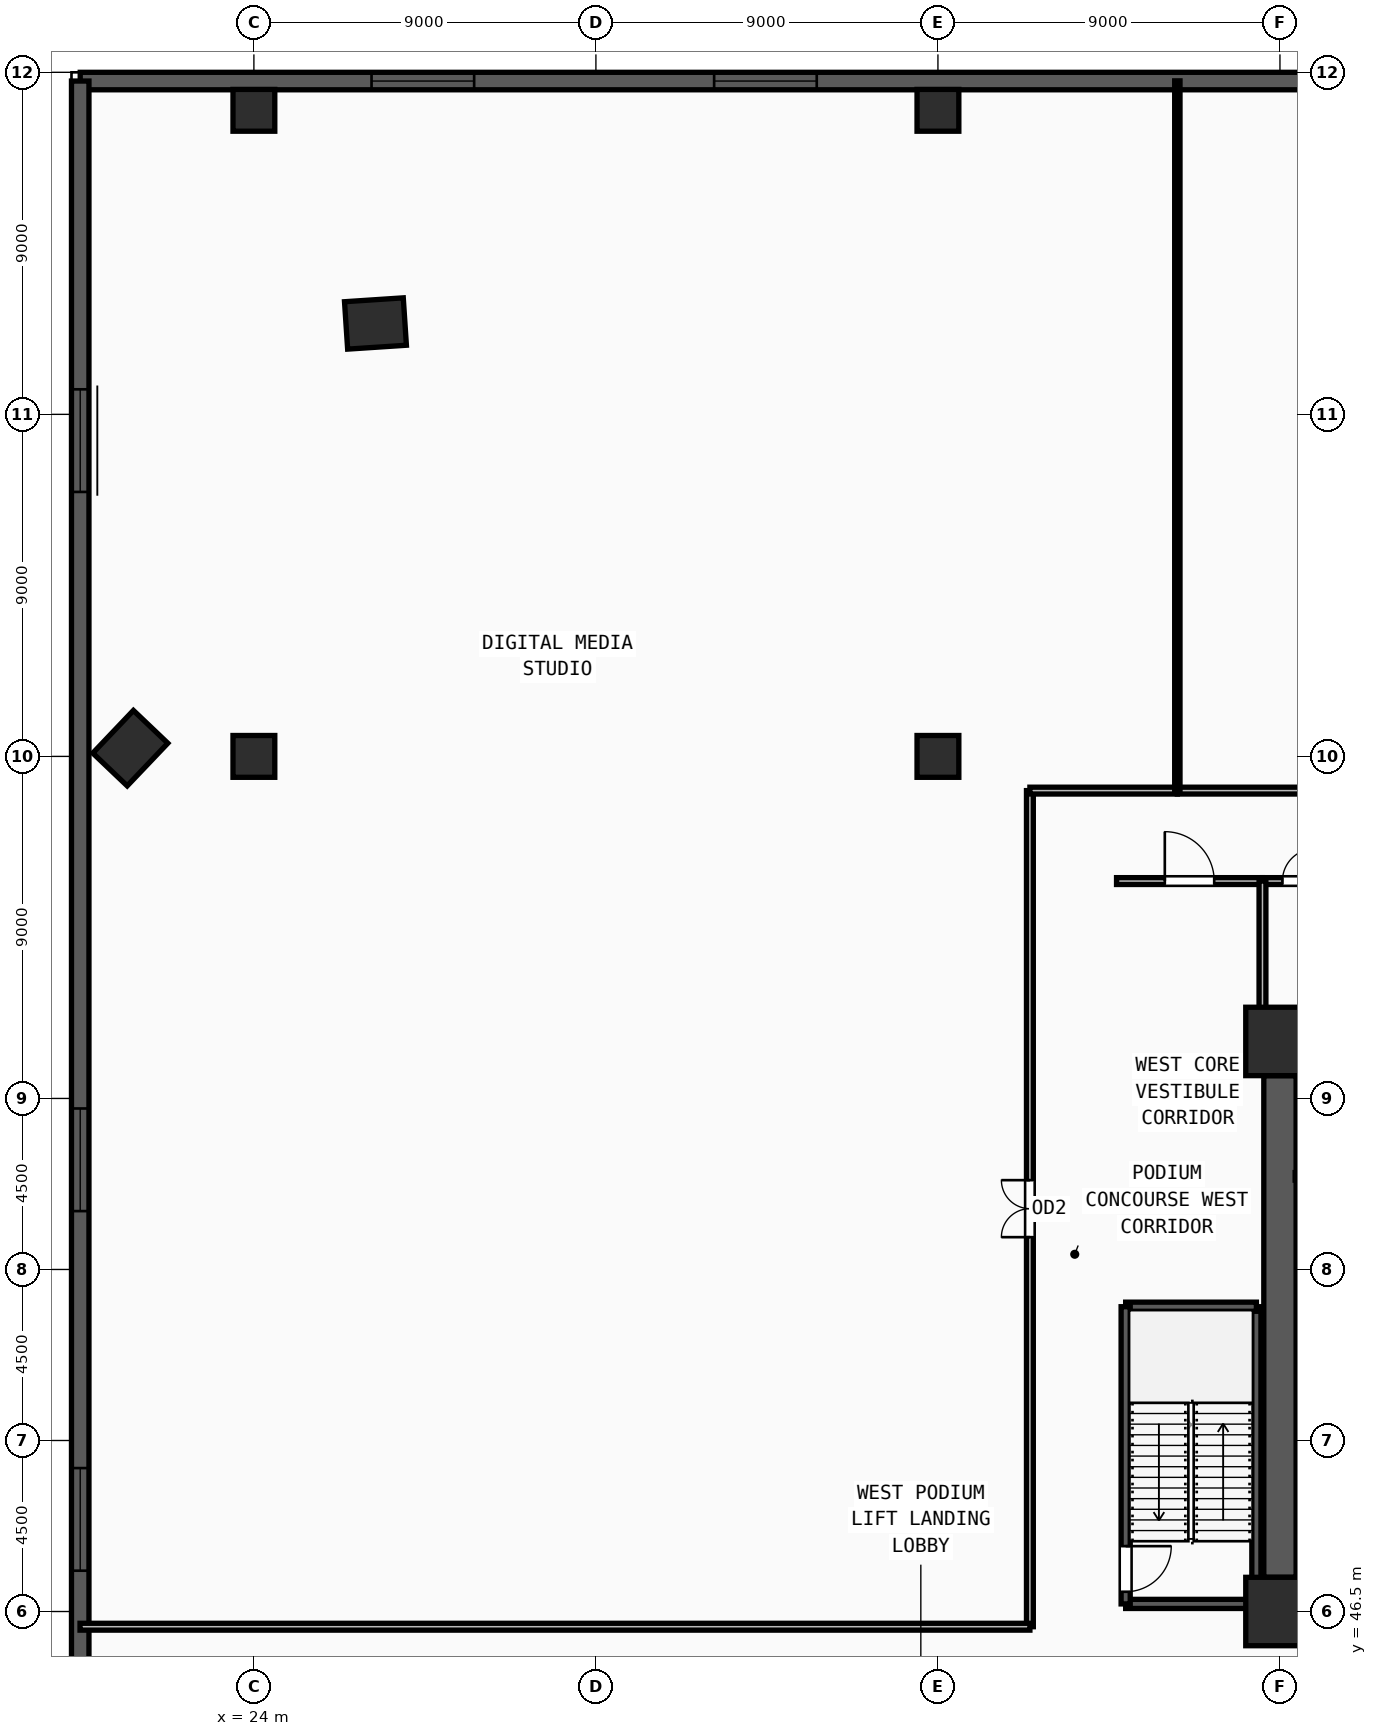
"""IFC4 building model, lengths in metres.
Left out: names, types, materials, properties, quantities, classifications, styles, units other than length and angle.
Written with IfcOpenShell. Run it as: python <this file> out.ifc"""

import sys

from ifc_helpers import new_model, si_unit, direction, frame, frame_2d, origin, origin_2d, place, context, subcontext, project, spatial, rectangle, extrude, source, transform, mapped, element, fill, save


model = new_model("IFC4")
c1 = context("Model", 3, precision=1e-05, world=origin(), true_north=direction((0.0, 1.0)))
c2 = subcontext(c1, "Body", "Model", "MODEL_VIEW")
j1 = project(units=[si_unit("LENGTHUNIT", "METRE"), si_unit("PLANEANGLEUNIT", "RADIAN")], contexts=[c1])
p1 = place(None, origin())
s1 = spatial("IfcSite", under=j1, at=p1, CompositionType="ELEMENT")
p2 = place(p1, origin())
s2 = spatial("IfcBuilding", under=s1, at=p2, CompositionType="ELEMENT")
p3 = place(p2, frame((0.0, 0.0, 14.4)))
s3 = spatial("IfcBuildingStorey", under=s2, at=p3, CompositionType="ELEMENT", Elevation=14.4)
m1 = source(origin(), c2, "Body", "SweptSolid", [
    extrude(rectangle(XDim=1.8, YDim=1.8, at=origin_2d()), origin(), (0.0, 0.0, 1.0), 4.5),
])
for number, where, z_axis, x_axis in (
    (1, (51.0, 46.5, 0.0), (0.0, 0.0, 1.0), (1.0, 0.0, 0.0)),
    (2, (51.0, 61.5, 0.0), (0.0, 0.0, 1.0), (1.0, 0.0, 0.0)),
):
    element("IfcColumn", number, at=place(p3, frame(where, z_axis=z_axis, x_axis=x_axis)), inside=s3, PredefinedType="COLUMN", context=c2, shape_type="MappedRepresentation", body=[
        mapped(m1, transform((0.0, 0.0, 0.0), x_axis=(1.0, 0.0, 0.0), y_axis=(0.0, 1.0, 0.0), z_axis=(0.0, 0.0, 1.0), scale=1.0)),
    ])
m2 = source(origin(), c2, "Body", "SweptSolid", [
    extrude(rectangle(XDim=1.55, YDim=1.25, at=origin_2d()), origin(), (0.0, 0.0, 1.0), 4.5),
])
for number, where, z_axis, x_axis in (
    (3, (20.748, 69.217, 0.0), (0.0, 0.0, 1.0), (0.689, 0.724, 0.0)),
    (4, (27.199, 80.391, 0.0), (0.0, 0.0, 1.0), (0.998, 0.066, 0.0)),
):
    element("IfcColumn", number, at=place(p3, frame(where, z_axis=z_axis, x_axis=x_axis)), inside=s3, PredefinedType="COLUMN", context=c2, shape_type="MappedRepresentation", body=[
        mapped(m2, transform((0.0, 0.0, 0.0), x_axis=(1.0, 0.0, 0.0), y_axis=(0.0, 1.0, 0.0), z_axis=(0.0, 0.0, 1.0), scale=1.0)),
    ])
m3 = source(origin(), c2, "Body", "SweptSolid", [
    extrude(rectangle(XDim=1.1, YDim=1.1, at=origin_2d()), origin(), (0.0, 0.0, 1.0), 4.5),
])
for number, where, z_axis, x_axis in (
    (5, (24.0, 69.0, 0.0), (0.0, 0.0, 1.0), (1.0, 0.0, 0.0)),
    (6, (42.0, 69.0, 0.0), (0.0, 0.0, 1.0), (1.0, 0.0, 0.0)),
    (7, (24.0, 86.0, 0.0), (0.0, 0.0, 1.0), (1.0, 0.0, 0.0)),
    (8, (42.0, 86.0, 0.0), (0.0, 0.0, 1.0), (1.0, 0.0, 0.0)),
):
    element("IfcColumn", number, at=place(p3, frame(where, z_axis=z_axis, x_axis=x_axis)), inside=s3, PredefinedType="COLUMN", context=c2, shape_type="MappedRepresentation", body=[
        mapped(m3, transform((0.0, 0.0, 0.0), x_axis=(1.0, 0.0, 0.0), y_axis=(0.0, 1.0, 0.0), z_axis=(0.0, 0.0, 1.0), scale=1.0)),
    ])
p4 = place(p3, frame((100.57, 86.77, 0.0), z_axis=(0.0, 0.0, 1.0), x_axis=(-1.0, 0.0, 0.0)))
e9 = element("IfcWall", 9, at=p4, inside=s3, PredefinedType="SOLIDWALL", context=c2, shape_type="SweptSolid", body=[
    extrude(rectangle(XDim=81.14, YDim=0.46, at=frame_2d((40.57, 0.0))), origin(), (0.0, 0.0, 1.0), 4.25),
])
m4 = source(origin(), c2, "Body", "SweptSolid", [
    extrude(rectangle(XDim=2.7, YDim=2.35, at=frame_2d((1.35, 1.175))), frame((0.0, 0.24, 0.0), z_axis=(0.0, -1.0, 0.0), x_axis=(1.0, 0.0, 0.0)), (0.0, 0.0, 1.0), 0.48),
])
p5 = place(p4, frame((7.666, 0.0, 0.55)))
e10 = element("IfcOpeningElement", 10, at=p5, cuts=e9, PredefinedType="OPENING", context=c2, shape_type="MappedRepresentation", body=[
    mapped(m4, transform((0.0, 0.0, 0.0), x_axis=(1.0, 0.0, 0.0), y_axis=(0.0, 1.0, 0.0), z_axis=(0.0, 0.0, 1.0), scale=1.0)),
])
p6 = place(p4, frame((16.681, 0.0, 0.55)))
e11 = element("IfcOpeningElement", 11, at=p6, cuts=e9, PredefinedType="OPENING", context=c2, shape_type="MappedRepresentation", body=[
    mapped(m4, transform((0.0, 0.0, 0.0), x_axis=(1.0, 0.0, 0.0), y_axis=(0.0, 1.0, 0.0), z_axis=(0.0, 0.0, 1.0), scale=1.0)),
])
p7 = place(p4, frame((34.712, 0.0, 0.55)))
e12 = element("IfcOpeningElement", 12, at=p7, cuts=e9, PredefinedType="OPENING", context=c2, shape_type="MappedRepresentation", body=[
    mapped(m4, transform((0.0, 0.0, 0.0), x_axis=(1.0, 0.0, 0.0), y_axis=(0.0, 1.0, 0.0), z_axis=(0.0, 0.0, 1.0), scale=1.0)),
])
p8 = place(p4, frame((43.728, 0.0, 0.55)))
e13 = element("IfcOpeningElement", 13, at=p8, cuts=e9, PredefinedType="OPENING", context=c2, shape_type="MappedRepresentation", body=[
    mapped(m4, transform((0.0, 0.0, 0.0), x_axis=(1.0, 0.0, 0.0), y_axis=(0.0, 1.0, 0.0), z_axis=(0.0, 0.0, 1.0), scale=1.0)),
])
p9 = place(p4, frame((61.759, 0.0, 0.55)))
e14 = element("IfcOpeningElement", 14, at=p9, cuts=e9, PredefinedType="OPENING", context=c2, shape_type="MappedRepresentation", body=[
    mapped(m4, transform((0.0, 0.0, 0.0), x_axis=(1.0, 0.0, 0.0), y_axis=(0.0, 1.0, 0.0), z_axis=(0.0, 0.0, 1.0), scale=1.0)),
])
p10 = place(p4, frame((70.774, 0.0, 0.55)))
e15 = element("IfcOpeningElement", 15, at=p10, cuts=e9, PredefinedType="OPENING", context=c2, shape_type="MappedRepresentation", body=[
    mapped(m4, transform((0.0, 0.0, 0.0), x_axis=(1.0, 0.0, 0.0), y_axis=(0.0, 1.0, 0.0), z_axis=(0.0, 0.0, 1.0), scale=1.0)),
])
p11 = place(p3, frame((19.43, 86.77, 0.0), z_axis=(0.0, 0.0, 1.0), x_axis=(0.0, -1.0, 0.0)))
e16 = element("IfcWall", 16, at=p11, inside=s3, PredefinedType="SOLIDWALL", context=c2, shape_type="SweptSolid", body=[
    extrude(rectangle(XDim=66.23, YDim=0.46, at=frame_2d((33.115, 0.0))), origin(), (0.0, 0.0, 1.0), 4.25),
])
p12 = place(p11, frame((8.111, 0.0, 0.55)))
e17 = element("IfcOpeningElement", 17, at=p12, cuts=e16, PredefinedType="OPENING", context=c2, shape_type="MappedRepresentation", body=[
    mapped(m4, transform((0.0, 0.0, 0.0), x_axis=(1.0, 0.0, 0.0), y_axis=(0.0, 1.0, 0.0), z_axis=(0.0, 0.0, 1.0), scale=1.0)),
])
p13 = place(p11, frame((27.034, 0.0, 0.55)))
e18 = element("IfcOpeningElement", 18, at=p13, cuts=e16, PredefinedType="OPENING", context=c2, shape_type="MappedRepresentation", body=[
    mapped(m4, transform((0.0, 0.0, 0.0), x_axis=(1.0, 0.0, 0.0), y_axis=(0.0, 1.0, 0.0), z_axis=(0.0, 0.0, 1.0), scale=1.0)),
])
p14 = place(p11, frame((36.496, 0.0, 0.55)))
e19 = element("IfcOpeningElement", 19, at=p14, cuts=e16, PredefinedType="OPENING", context=c2, shape_type="MappedRepresentation", body=[
    mapped(m4, transform((0.0, 0.0, 0.0), x_axis=(1.0, 0.0, 0.0), y_axis=(0.0, 1.0, 0.0), z_axis=(0.0, 0.0, 1.0), scale=1.0)),
])
p15 = place(p11, frame((45.957, 0.0, 0.55)))
e20 = element("IfcOpeningElement", 20, at=p15, cuts=e16, PredefinedType="OPENING", context=c2, shape_type="MappedRepresentation", body=[
    mapped(m4, transform((0.0, 0.0, 0.0), x_axis=(1.0, 0.0, 0.0), y_axis=(0.0, 1.0, 0.0), z_axis=(0.0, 0.0, 1.0), scale=1.0)),
])
p16 = place(p11, frame((55.419, 0.0, 0.55)))
e21 = element("IfcOpeningElement", 21, at=p16, cuts=e16, PredefinedType="OPENING", context=c2, shape_type="MappedRepresentation", body=[
    mapped(m4, transform((0.0, 0.0, 0.0), x_axis=(1.0, 0.0, 0.0), y_axis=(0.0, 1.0, 0.0), z_axis=(0.0, 0.0, 1.0), scale=1.0)),
])
p17 = place(p3, frame((51.0, 47.4, 0.0), z_axis=(0.0, 0.0, 1.0), x_axis=(0.0, 1.0, 0.0)))
e22 = element("IfcWall", 22, at=p17, inside=s3, PredefinedType="SHEAR", context=c2, shape_type="SweptSolid", body=[
    extrude(rectangle(XDim=13.2, YDim=0.85, at=frame_2d((6.6, 0.0))), origin(), (0.0, 0.0, 1.0), 4.25),
])
p18 = place(p3, frame((46.94, 46.7, 0.0), z_axis=(0.0, 0.0, 1.0), x_axis=(1.0, 0.0, 0.0)))
e23 = element("IfcWall", 23, at=p18, inside=s3, PredefinedType="SOLIDWALL", context=c2, shape_type="SweptSolid", body=[
    extrude(rectangle(XDim=3.44, YDim=0.24, at=frame_2d((1.72, 0.0))), origin(), (0.0, 0.0, 1.0), 4.25),
])
p19 = place(p3, frame((50.38, 46.7, 0.0), z_axis=(0.0, 0.0, 1.0), x_axis=(0.0, 1.0, 0.0)))
e24 = element("IfcWall", 24, at=p19, inside=s3, PredefinedType="SOLIDWALL", context=c2, shape_type="SweptSolid", body=[
    extrude(rectangle(XDim=7.82, YDim=0.24, at=frame_2d((3.91, 0.0))), origin(), (0.0, 0.0, 1.0), 4.25),
])
p20 = place(p3, frame((50.38, 54.52, 0.0), z_axis=(0.0, 0.0, 1.0), x_axis=(-1.0, 0.0, 0.0)))
e25 = element("IfcWall", 25, at=p20, inside=s3, PredefinedType="SOLIDWALL", context=c2, shape_type="SweptSolid", body=[
    extrude(rectangle(XDim=3.44, YDim=0.24, at=frame_2d((1.72, 0.0))), origin(), (0.0, 0.0, 1.0), 4.25),
])
p21 = place(p3, frame((46.94, 54.52, 0.0), z_axis=(0.0, 0.0, 1.0), x_axis=(0.0, -1.0, 0.0)))
e26 = element("IfcWall", 26, at=p21, inside=s3, PredefinedType="SOLIDWALL", context=c2, shape_type="SweptSolid", body=[
    extrude(rectangle(XDim=7.82, YDim=0.24, at=frame_2d((3.91, 0.0))), origin(), (0.0, 0.0, 1.0), 4.25),
])
m5 = source(origin(), c2, "Body", "SweptSolid", [
    extrude(rectangle(XDim=1.2, YDim=2.2, at=frame_2d((0.6, 1.1))), frame((0.0, 0.13, 0.0), z_axis=(0.0, -1.0, 0.0), x_axis=(1.0, 0.0, 0.0)), (0.0, 0.0, 1.0), 0.26),
])
p22 = place(p21, frame((6.3, 0.0, 0.0)))
e27 = element("IfcOpeningElement", 27, at=p22, cuts=e26, PredefinedType="OPENING", context=c2, shape_type="MappedRepresentation", body=[
    mapped(m5, transform((0.0, 0.0, 0.0), x_axis=(1.0, 0.0, 0.0), y_axis=(0.0, 1.0, 0.0), z_axis=(0.0, 0.0, 1.0), scale=1.0)),
])
for number, where, z_axis, x_axis in (
    (28, (51.4, 57.95, 0.0), (0.0, 0.0, 1.0), (1.0, 0.0, 0.0)),
    (29, (53.8, 60.88, 0.0), (0.0, 0.0, 1.0), (-1.0, 0.0, 0.0)),
):
    element("IfcWall", number, at=place(p3, frame(where, z_axis=z_axis, x_axis=x_axis)), inside=s3, PredefinedType="SOLIDWALL", context=c2, shape_type="SweptSolid", body=[
        extrude(rectangle(XDim=2.4, YDim=0.2, at=frame_2d((1.2, 0.0))), origin(), (0.0, 0.0, 1.0), 4.25),
    ])
p23 = place(p3, frame((50.54, 65.72, 0.0), z_axis=(0.0, 0.0, 1.0), x_axis=(1.0, 0.0, 0.0)))
e30 = element("IfcWall", 30, at=p23, inside=s3, PredefinedType="PARTITIONING", context=c2, shape_type="SweptSolid", body=[
    extrude(rectangle(XDim=1.9, YDim=0.18, at=frame_2d((0.95, 0.0))), origin(), (0.0, 0.0, 1.0), 4.25),
])
m6 = source(origin(), c2, "Body", "SweptSolid", [
    extrude(rectangle(XDim=0.85, YDim=2.1, at=frame_2d((0.425, 1.05))), frame((0.0, 0.1, 0.0), z_axis=(0.0, -1.0, 0.0), x_axis=(1.0, 0.0, 0.0)), (0.0, 0.0, 1.0), 0.2),
])
p24 = place(p23, frame((0.525, 0.0, 0.0)))
e31 = element("IfcOpeningElement", 31, at=p24, cuts=e30, PredefinedType="OPENING", context=c2, shape_type="MappedRepresentation", body=[
    mapped(m6, transform((0.0, 0.0, 0.0), x_axis=(1.0, 0.0, 0.0), y_axis=(0.0, 1.0, 0.0), z_axis=(0.0, 0.0, 1.0), scale=1.0)),
])
p25 = place(p3, frame((46.7, 65.72, 0.0), z_axis=(0.0, 0.0, 1.0), x_axis=(1.0, 0.0, 0.0)))
e32 = element("IfcWall", 32, at=p25, inside=s3, PredefinedType="PARTITIONING", context=c2, shape_type="SweptSolid", body=[
    extrude(rectangle(XDim=3.84, YDim=0.18, at=frame_2d((1.92, 0.0))), origin(), (0.0, 0.0, 1.0), 4.25),
])
m7 = source(origin(), c2, "Body", "SweptSolid", [
    extrude(rectangle(XDim=1.3, YDim=2.2, at=frame_2d((0.65, 1.1))), frame((0.0, 0.1, 0.0), z_axis=(0.0, -1.0, 0.0), x_axis=(1.0, 0.0, 0.0)), (0.0, 0.0, 1.0), 0.2),
])
p26 = place(p25, frame((1.27, 0.0, 0.0)))
e33 = element("IfcOpeningElement", 33, at=p26, cuts=e32, PredefinedType="OPENING", context=c2, shape_type="MappedRepresentation", body=[
    mapped(m7, transform((0.0, 0.0, 0.0), x_axis=(1.0, 0.0, 0.0), y_axis=(0.0, 1.0, 0.0), z_axis=(0.0, 0.0, 1.0), scale=1.0)),
])
p27 = place(p3, frame((44.42, 46.1, 0.0), z_axis=(0.0, 0.0, 1.0), x_axis=(0.0, 1.0, 0.0)))
e34 = element("IfcWall", 34, at=p27, inside=s3, PredefinedType="PARTITIONING", context=c2, shape_type="SweptSolid", body=[
    extrude(rectangle(XDim=22.0, YDim=0.18, at=frame_2d((11.0, 0.0))), origin(), (0.0, 0.0, 1.0), 4.25),
])
m8 = source(origin(), c2, "Body", "SweptSolid", [
    extrude(rectangle(XDim=1.5, YDim=2.2, at=frame_2d((0.75, 1.1))), frame((0.0, 0.1, 0.0), z_axis=(0.0, -1.0, 0.0), x_axis=(1.0, 0.0, 0.0)), (0.0, 0.0, 1.0), 0.2),
])
p28 = place(p27, frame((10.25, 0.0, 0.0)))
e35 = element("IfcOpeningElement", 35, at=p28, cuts=e34, PredefinedType="OPENING", context=c2, shape_type="MappedRepresentation", body=[
    mapped(m8, transform((0.0, 0.0, 0.0), x_axis=(1.0, 0.0, 0.0), y_axis=(0.0, 1.0, 0.0), z_axis=(0.0, 0.0, 1.0), scale=1.0)),
])
p29 = place(p3, frame((48.3, 68.1, 0.0), z_axis=(0.0, 0.0, 1.0), x_axis=(1.0, 0.0, 0.0)))
e36 = element("IfcWall", 36, at=p29, inside=s3, PredefinedType="PARTITIONING", context=c2, shape_type="SweptSolid", body=[
    extrude(rectangle(XDim=23.4, YDim=0.18, at=frame_2d((11.7, 0.0))), origin(), (0.0, 0.0, 1.0), 4.25),
])
m9 = source(origin(), c2, "Body", "SweptSolid", [
    extrude(rectangle(XDim=1.0, YDim=2.2, at=frame_2d((0.5, 1.1))), frame((0.0, 0.1, 0.0), z_axis=(0.0, -1.0, 0.0), x_axis=(1.0, 0.0, 0.0)), (0.0, 0.0, 1.0), 0.2),
])
p30 = place(p29, frame((11.2, 0.0, 0.0)))
e37 = element("IfcOpeningElement", 37, at=p30, cuts=e36, PredefinedType="OPENING", context=c2, shape_type="MappedRepresentation", body=[
    mapped(m9, transform((0.0, 0.0, 0.0), x_axis=(1.0, 0.0, 0.0), y_axis=(0.0, 1.0, 0.0), z_axis=(0.0, 0.0, 1.0), scale=1.0)),
])
p31 = place(p3, frame((19.425, 46.1, 0.0), z_axis=(0.0, 0.0, 1.0), x_axis=(1.0, 0.0, 0.0)))
e38 = element("IfcWall", 38, at=p31, inside=s3, PredefinedType="PARTITIONING", context=c2, shape_type="SweptSolid", body=[
    extrude(rectangle(XDim=24.995, YDim=0.18, at=frame_2d((12.498, 0.0))), origin(), (0.0, 0.0, 1.0), 4.25),
])
p32 = place(p3, frame((44.42, 68.1, 0.0), z_axis=(0.0, 0.0, 1.0), x_axis=(1.0, 0.0, 0.0)))
e39 = element("IfcWall", 39, at=p32, inside=s3, PredefinedType="PARTITIONING", context=c2, shape_type="SweptSolid", body=[
    extrude(rectangle(XDim=3.88, YDim=0.18, at=frame_2d((1.94, 0.0))), origin(), (0.0, 0.0, 1.0), 4.25),
])
p33 = place(p3, frame((48.3, 68.1, 0.0), z_axis=(0.0, 0.0, 1.0), x_axis=(0.0, 1.0, 0.0)))
e40 = element("IfcWall", 40, at=p33, inside=s3, PredefinedType="PARTITIONING", context=c2, shape_type="SweptSolid", body=[
    extrude(rectangle(XDim=18.675, YDim=0.14, at=frame_2d((9.337, 0.0))), origin(), (0.0, 0.0, 1.0), 4.25),
])
p34 = place(p3, frame((50.54, 61.95, 0.0), z_axis=(0.0, 0.0, 1.0), x_axis=(0.0, 1.0, 0.0)))
e41 = element("IfcWall", 41, at=p34, inside=s3, PredefinedType="PARTITIONING", context=c2, shape_type="SweptSolid", body=[
    extrude(rectangle(XDim=3.77, YDim=0.18, at=frame_2d((1.885, 0.0))), origin(), (0.0, 0.0, 1.0), 4.25),
])
m10 = source(origin(), c2, "Body", "SweptSolid", [
    extrude(rectangle(XDim=2.7, YDim=2.35, at=frame_2d((1.35, 1.175))), frame((0.0, 0.03, 0.0), z_axis=(0.0, -1.0, 0.0), x_axis=(1.0, 0.0, 0.0)), (0.0, 0.0, 1.0), 0.06),
])
p35 = place(p9, origin())
e42 = element("IfcWindow", 42, at=p35, inside=s3, PartitioningType="TRIPLE_PANEL_VERTICAL", PredefinedType="WINDOW", context=c2, shape_type="MappedRepresentation", body=[
    mapped(m10, transform((0.0, 0.0, 0.0), x_axis=(1.0, 0.0, 0.0), y_axis=(0.0, 1.0, 0.0), z_axis=(0.0, 0.0, 1.0), scale=1.0)),
])
fill(e14, e42)
p36 = place(p10, origin())
e43 = element("IfcWindow", 43, at=p36, inside=s3, PartitioningType="TRIPLE_PANEL_VERTICAL", PredefinedType="WINDOW", context=c2, shape_type="MappedRepresentation", body=[
    mapped(m10, transform((0.0, 0.0, 0.0), x_axis=(1.0, 0.0, 0.0), y_axis=(0.0, 1.0, 0.0), z_axis=(0.0, 0.0, 1.0), scale=1.0)),
])
fill(e15, e43)
p37 = place(p12, origin())
e44 = element("IfcWindow", 44, at=p37, inside=s3, PartitioningType="TRIPLE_PANEL_VERTICAL", PredefinedType="WINDOW", context=c2, shape_type="MappedRepresentation", body=[
    mapped(m10, transform((0.0, 0.0, 0.0), x_axis=(1.0, 0.0, 0.0), y_axis=(0.0, 1.0, 0.0), z_axis=(0.0, 0.0, 1.0), scale=1.0)),
])
fill(e17, e44)
p38 = place(p13, origin())
e45 = element("IfcWindow", 45, at=p38, inside=s3, PartitioningType="TRIPLE_PANEL_VERTICAL", PredefinedType="WINDOW", context=c2, shape_type="MappedRepresentation", body=[
    mapped(m10, transform((0.0, 0.0, 0.0), x_axis=(1.0, 0.0, 0.0), y_axis=(0.0, 1.0, 0.0), z_axis=(0.0, 0.0, 1.0), scale=1.0)),
])
fill(e18, e45)
p39 = place(p14, origin())
e46 = element("IfcWindow", 46, at=p39, inside=s3, PartitioningType="TRIPLE_PANEL_VERTICAL", PredefinedType="WINDOW", context=c2, shape_type="MappedRepresentation", body=[
    mapped(m10, transform((0.0, 0.0, 0.0), x_axis=(1.0, 0.0, 0.0), y_axis=(0.0, 1.0, 0.0), z_axis=(0.0, 0.0, 1.0), scale=1.0)),
])
fill(e19, e46)
m11 = source(origin(), c2, "Body", "SweptSolid", [
    extrude(rectangle(XDim=1.2, YDim=2.2, at=frame_2d((0.6, 1.1))), frame((0.0, 0.025, 0.0), z_axis=(0.0, -1.0, 0.0), x_axis=(1.0, 0.0, 0.0)), (0.0, 0.0, 1.0), 0.05),
])
p40 = place(p22, origin())
e47 = element("IfcDoor", 47, at=p40, inside=s3, OperationType="SINGLE_SWING_LEFT", PredefinedType="DOOR", context=c2, shape_type="MappedRepresentation", body=[
    mapped(m11, transform((0.0, 0.0, 0.0), x_axis=(1.0, 0.0, 0.0), y_axis=(0.0, 1.0, 0.0), z_axis=(0.0, 0.0, 1.0), scale=1.0)),
])
fill(e27, e47)
m12 = source(origin(), c2, "Body", "SweptSolid", [
    extrude(rectangle(XDim=0.85, YDim=2.1, at=frame_2d((0.425, 1.05))), frame((0.0, 0.025, 0.0), z_axis=(0.0, -1.0, 0.0), x_axis=(1.0, 0.0, 0.0)), (0.0, 0.0, 1.0), 0.05),
])
p41 = place(p24, origin())
e48 = element("IfcDoor", 48, at=p41, inside=s3, OperationType="SINGLE_SWING_RIGHT", PredefinedType="DOOR", context=c2, shape_type="MappedRepresentation", body=[
    mapped(m12, transform((0.0, 0.0, 0.0), x_axis=(1.0, 0.0, 0.0), y_axis=(0.0, 1.0, 0.0), z_axis=(0.0, 0.0, 1.0), scale=1.0)),
])
fill(e31, e48)
m13 = source(origin(), c2, "Body", "SweptSolid", [
    extrude(rectangle(XDim=1.3, YDim=2.2, at=frame_2d((0.65, 1.1))), frame((0.0, 0.025, 0.0), z_axis=(0.0, -1.0, 0.0), x_axis=(1.0, 0.0, 0.0)), (0.0, 0.0, 1.0), 0.05),
])
p42 = place(p26, origin())
e49 = element("IfcDoor", 49, at=p42, inside=s3, OperationType="SINGLE_SWING_LEFT", PredefinedType="DOOR", context=c2, shape_type="MappedRepresentation", body=[
    mapped(m13, transform((0.0, 0.0, 0.0), x_axis=(1.0, 0.0, 0.0), y_axis=(0.0, 1.0, 0.0), z_axis=(0.0, 0.0, 1.0), scale=1.0)),
])
fill(e33, e49)
m14 = source(origin(), c2, "Body", "SweptSolid", [
    extrude(rectangle(XDim=1.5, YDim=2.2, at=frame_2d((0.75, 1.1))), frame((0.0, 0.025, 0.0), z_axis=(0.0, -1.0, 0.0), x_axis=(1.0, 0.0, 0.0)), (0.0, 0.0, 1.0), 0.05),
])
p43 = place(p28, origin())
e50 = element("IfcDoor", 50, at=p43, inside=s3, OperationType="DOUBLE_DOOR_SINGLE_SWING", PredefinedType="DOOR", context=c2, shape_type="MappedRepresentation", body=[
    mapped(m14, transform((0.0, 0.0, 0.0), x_axis=(1.0, 0.0, 0.0), y_axis=(0.0, 1.0, 0.0), z_axis=(0.0, 0.0, 1.0), scale=1.0)),
])
fill(e35, e50)
save(model, sys.argv[1])
